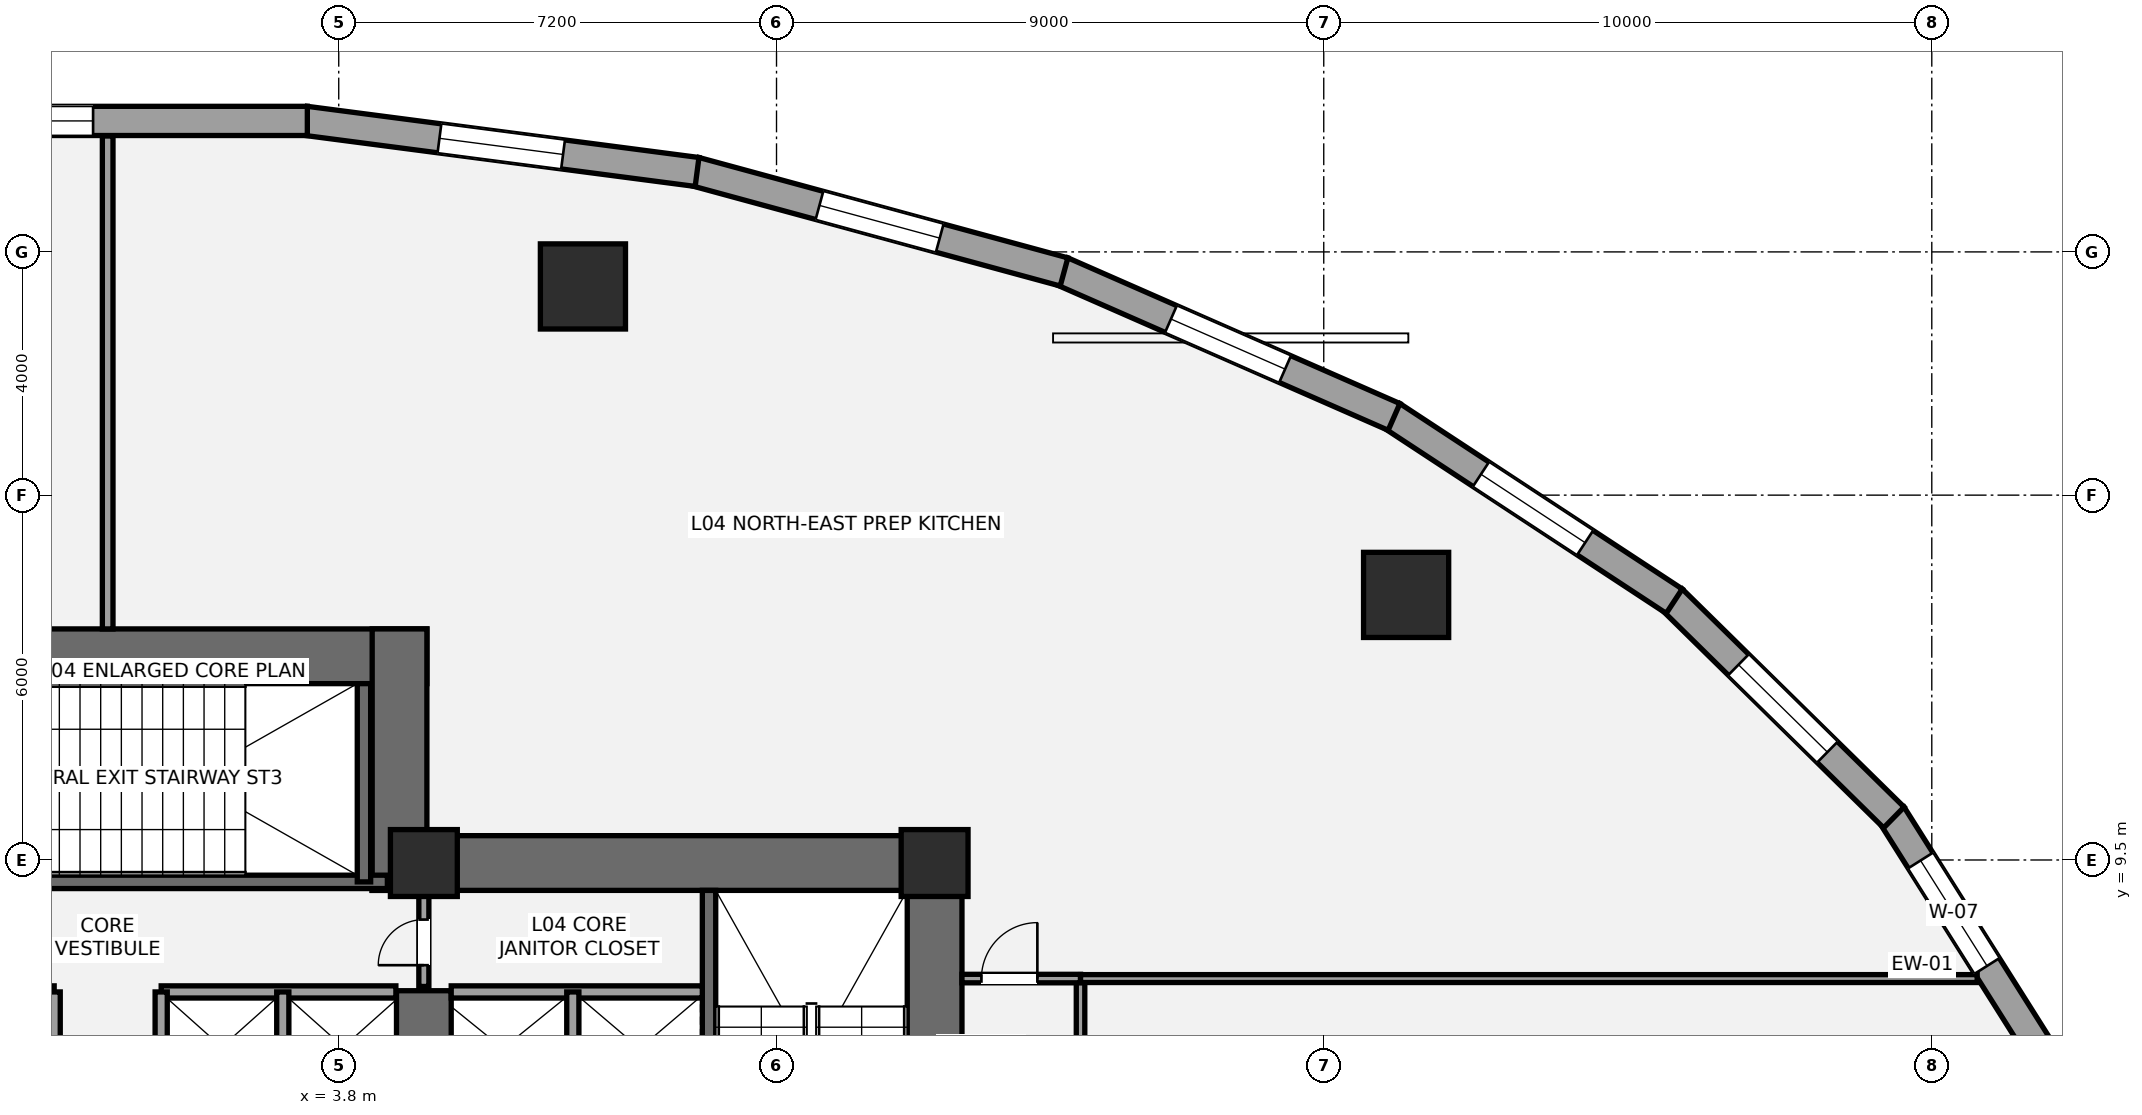
"""IFC4 building model, lengths in metres.
Left out: names, types, materials, properties, quantities, classifications, styles, units other than length and angle.
Written with IfcOpenShell. Run it as: python <this file> out.ifc"""

import sys

from ifc_helpers import new_model, si_unit, direction, frame, frame_2d, origin, origin_2d, place, context, subcontext, project, spatial, rectangle, hollow_circle, extrude, element, fill, save


model = new_model("IFC4")
c1 = context("Model", 3, precision=1e-05, world=origin(), true_north=direction((0.0, 1.0)))
c2 = subcontext(c1, "Body", "Model", "MODEL_VIEW")
j1 = project(units=[si_unit("LENGTHUNIT", "METRE"), si_unit("PLANEANGLEUNIT", "RADIAN")], contexts=[c1])
p1 = place(None, origin())
s1 = spatial("IfcSite", under=j1, at=p1, CompositionType="ELEMENT")
p2 = place(p1, origin())
s2 = spatial("IfcBuilding", under=s1, at=p2, CompositionType="ELEMENT")
p3 = place(p2, frame((0.0, 0.0, 18.6)))
s3 = spatial("IfcBuildingStorey", under=s2, at=p3, CompositionType="ELEMENT", Elevation=18.6)
p4 = place(p3, frame((13.6, 0.95, 0.0), z_axis=(0.0, 0.0, 1.0), x_axis=(0.0, 1.0, 0.0)))
e1 = element("IfcWall", 1, at=p4, inside=s3, PredefinedType="SHEAR", context=c2, shape_type="SweptSolid", body=[
    extrude(rectangle(XDim=8.95, YDim=0.9, at=frame_2d((4.475, 0.0))), origin(), (0.0, 0.0, 1.0), 4.2),
])
p5 = place(p3, frame((4.35, 9.45, 0.0), z_axis=(0.0, 0.0, 1.0), x_axis=(1.0, 0.0, 0.0)))
e2 = element("IfcWall", 2, at=p5, inside=s3, PredefinedType="SHEAR", context=c2, shape_type="SweptSolid", body=[
    extrude(rectangle(XDim=9.7, YDim=0.9, at=frame_2d((4.85, 0.0))), origin(), (0.0, 0.0, 1.0), 4.2),
])
p6 = place(p3, frame((5.2, 5.35, 0.0), z_axis=(0.0, 0.0, 1.0), x_axis=(0.0, 1.0, 0.0)))
e3 = element("IfcWall", 3, at=p6, inside=s3, PredefinedType="SHEAR", context=c2, shape_type="SweptSolid", body=[
    extrude(rectangle(XDim=2.0, YDim=0.9, at=frame_2d((1.0, 0.0))), origin(), (0.0, 0.0, 1.0), 4.2),
])
p7 = place(p3, frame((9.89, 1.85, 0.0), z_axis=(0.0, 0.0, 1.0), x_axis=(0.0, 1.0, 0.0)))
e4 = element("IfcWall", 4, at=p7, inside=s3, PredefinedType="SHEAR", context=c2, shape_type="SweptSolid", body=[
    extrude(rectangle(XDim=7.15, YDim=0.22, at=frame_2d((3.575, 0.0))), origin(), (0.0, 0.0, 1.0), 4.2),
])
p8 = place(p3, frame((-5.25, 12.85, 0.0), z_axis=(0.0, 0.0, 1.0), x_axis=(1.0, 0.0, 0.0)))
e5 = element("IfcWall", 5, at=p8, inside=s3, PredefinedType="SHEAR", context=c2, shape_type="SweptSolid", body=[
    extrude(rectangle(XDim=10.5, YDim=0.9, at=frame_2d((5.25, 0.0))), origin(), (0.0, 0.0, 1.0), 4.2),
])
p9 = place(p3, frame((4.8, 9.0, 0.0), z_axis=(0.0, 0.0, 1.0), x_axis=(0.0, 1.0, 0.0)))
e6 = element("IfcWall", 6, at=p9, inside=s3, PredefinedType="SHEAR", context=c2, shape_type="SweptSolid", body=[
    extrude(rectangle(XDim=4.3, YDim=0.9, at=frame_2d((2.15, 0.0))), origin(), (0.0, 0.0, 1.0), 4.2),
])
p10 = place(p3, frame((-4.7, 9.14, 0.0), z_axis=(0.0, 0.0, 1.0), x_axis=(1.0, 0.0, 0.0)))
e7 = element("IfcWall", 7, at=p10, inside=s3, PredefinedType="SHEAR", context=c2, shape_type="SweptSolid", body=[
    extrude(rectangle(XDim=9.3, YDim=0.22, at=frame_2d((4.65, 0.0))), origin(), (0.0, 0.0, 1.0), 4.2),
])
p11 = place(p10, frame((1.15, 0.0, 0.0)))
e8 = element("IfcOpeningElement", 8, at=p11, cuts=e7, PredefinedType="OPENING", context=c2, shape_type="SweptSolid", body=[
    extrude(rectangle(XDim=1.05, YDim=2.15, at=frame_2d((0.525, 1.075))), frame((0.0, 0.12, 0.0), z_axis=(0.0, -1.0, 0.0), x_axis=(1.0, 0.0, 0.0)), (0.0, 0.0, 1.0), 0.24),
])
p12 = place(p3, frame((4.215, 9.14, 0.0), z_axis=(0.0, 0.0, 1.0), x_axis=(0.0, 1.0, 0.0)))
e9 = element("IfcWall", 9, at=p12, inside=s3, PredefinedType="SHEAR", context=c2, shape_type="SweptSolid", body=[
    extrude(rectangle(XDim=3.26, YDim=0.22, at=frame_2d((1.63, 0.0))), origin(), (0.0, 0.0, 1.0), 4.2),
])
for number, where, z_axis, x_axis in (
    (10, (5.2, 9.45, 0.0), (0.0, 0.0, 1.0), (1.0, 0.0, 0.0)),
    (11, (13.6, 9.45, 0.0), (0.0, 0.0, 1.0), (1.0, 0.0, 0.0)),
):
    element("IfcColumn", number, at=place(p3, frame(where, z_axis=z_axis, x_axis=x_axis)), inside=s3, PredefinedType="COLUMN", context=c2, shape_type="SweptSolid", body=[
        extrude(rectangle(XDim=1.1, YDim=1.1, at=origin_2d()), origin(), (0.0, 0.0, 1.0), 4.2),
    ])
for number, where, z_axis, x_axis in (
    (12, (21.354, 13.859, 0.0), (0.0, 0.0, 1.0), (1.0, 0.0, 0.0)),
    (13, (7.816, 18.932, 0.0), (0.0, 0.0, 1.0), (1.0, 0.0, 0.0)),
):
    element("IfcColumn", number, at=place(p3, frame(where, z_axis=z_axis, x_axis=x_axis)), inside=s3, PredefinedType="USERDEFINED", context=c2, shape_type="SweptSolid", body=[
        extrude(hollow_circle(Radius=0.7, WallThickness=0.05, at=origin_2d()), origin(), (0.0, 0.0, 1.0), 4.2),
    ])
p13 = place(p3, frame((29.341, 10.243, 0.0), z_axis=(0.0, 0.0, 1.0), x_axis=(0.53349762721, -0.845801561693, 0.0)))
e14 = element("IfcWall", 14, at=p13, inside=s3, PredefinedType="STANDARD", context=c2, shape_type="SweptSolid", body=[
    extrude(rectangle(XDim=4.711, YDim=0.48, at=frame_2d((2.355, 0.0))), origin(), (0.0, 0.0, 1.0), 3.109),
])
p14 = place(p13, frame((0.888, 0.0, 0.72)))
e15 = element("IfcOpeningElement", 15, at=p14, cuts=e14, PredefinedType="OPENING", context=c2, shape_type="SweptSolid", body=[
    extrude(rectangle(XDim=2.05, YDim=1.8, at=frame_2d((1.025, 0.9))), frame((0.0, 0.25, 0.0), z_axis=(0.0, -1.0, 0.0), x_axis=(1.0, 0.0, 0.0)), (0.0, 0.0, 1.0), 0.5),
])
p15 = place(p3, frame((25.728, 13.785, 0.0), z_axis=(0.0, 0.0, 1.0), x_axis=(0.713189080178, -0.700971708355, 0.0)))
e16 = element("IfcWall", 16, at=p15, inside=s3, PredefinedType="STANDARD", context=c2, shape_type="SweptSolid", body=[
    extrude(rectangle(XDim=5.116, YDim=0.48, at=frame_2d((2.558, 0.0))), origin(), (0.0, 0.0, 1.0), 3.109),
])
p16 = place(p15, frame((1.533, 0.0, 0.72)))
e17 = element("IfcOpeningElement", 17, at=p16, cuts=e16, PredefinedType="OPENING", context=c2, shape_type="SweptSolid", body=[
    extrude(rectangle(XDim=2.05, YDim=1.8, at=frame_2d((1.025, 0.9))), frame((0.0, 0.25, 0.0), z_axis=(0.0, -1.0, 0.0), x_axis=(1.0, 0.0, 0.0)), (0.0, 0.0, 1.0), 0.5),
])
p17 = place(p3, frame((21.121, 16.806, 0.0), z_axis=(0.0, 0.0, 1.0), x_axis=(0.835863918172, -0.548936708827, 0.0)))
e18 = element("IfcWall", 18, at=p17, inside=s3, PredefinedType="STANDARD", context=c2, shape_type="SweptSolid", body=[
    extrude(rectangle(XDim=5.555, YDim=0.48, at=frame_2d((2.778, 0.0))), origin(), (0.0, 0.0, 1.0), 3.109),
])
p18 = place(p17, frame((1.753, 0.0, 0.72)))
e19 = element("IfcOpeningElement", 19, at=p18, cuts=e18, PredefinedType="OPENING", context=c2, shape_type="SweptSolid", body=[
    extrude(rectangle(XDim=2.05, YDim=1.8, at=frame_2d((1.025, 0.9))), frame((0.0, 0.25, 0.0), z_axis=(0.0, -1.0, 0.0), x_axis=(1.0, 0.0, 0.0)), (0.0, 0.0, 1.0), 0.5),
])
p19 = place(p3, frame((15.695, 19.183, 0.0), z_axis=(0.0, 0.0, 1.0), x_axis=(0.91570760638, -0.401845218484, 0.0)))
e20 = element("IfcWall", 20, at=p19, inside=s3, PredefinedType="STANDARD", context=c2, shape_type="SweptSolid", body=[
    extrude(rectangle(XDim=5.963, YDim=0.48, at=frame_2d((2.981, 0.0))), origin(), (0.0, 0.0, 1.0), 3.109),
])
p20 = place(p19, frame((1.957, 0.0, 0.72)))
e21 = element("IfcOpeningElement", 21, at=p20, cuts=e20, PredefinedType="OPENING", context=c2, shape_type="SweptSolid", body=[
    extrude(rectangle(XDim=2.05, YDim=1.8, at=frame_2d((1.025, 0.9))), frame((0.0, 0.25, 0.0), z_axis=(0.0, -1.0, 0.0), x_axis=(1.0, 0.0, 0.0)), (0.0, 0.0, 1.0), 0.5),
])
p21 = place(p3, frame((9.662, 20.821, 0.0), z_axis=(0.0, 0.0, 1.0), x_axis=(0.964936550718, -0.262483243445, 0.0)))
e22 = element("IfcWall", 22, at=p21, inside=s3, PredefinedType="STANDARD", context=c2, shape_type="SweptSolid", body=[
    extrude(rectangle(XDim=6.288, YDim=0.48, at=frame_2d((3.144, 0.0))), origin(), (0.0, 0.0, 1.0), 3.109),
])
p22 = place(p21, frame((2.119, 0.0, 0.72)))
e23 = element("IfcOpeningElement", 23, at=p22, cuts=e22, PredefinedType="OPENING", context=c2, shape_type="SweptSolid", body=[
    extrude(rectangle(XDim=2.05, YDim=1.8, at=frame_2d((1.025, 0.9))), frame((0.0, 0.25, 0.0), z_axis=(0.0, -1.0, 0.0), x_axis=(1.0, 0.0, 0.0)), (0.0, 0.0, 1.0), 0.5),
])
p23 = place(p3, frame((3.252, 21.656, 0.0), z_axis=(0.0, 0.0, 1.0), x_axis=(0.991576921472, -0.129519144545, 0.0)))
e24 = element("IfcWall", 24, at=p23, inside=s3, PredefinedType="STANDARD", context=c2, shape_type="SweptSolid", body=[
    extrude(rectangle(XDim=6.496, YDim=0.48, at=frame_2d((3.248, 0.0))), origin(), (0.0, 0.0, 1.0), 3.109),
])
p24 = place(p23, frame((2.223, 0.0, 0.72)))
e25 = element("IfcOpeningElement", 25, at=p24, cuts=e24, PredefinedType="OPENING", context=c2, shape_type="SweptSolid", body=[
    extrude(rectangle(XDim=2.05, YDim=1.8, at=frame_2d((1.025, 0.9))), frame((0.0, 0.25, 0.0), z_axis=(0.0, -1.0, 0.0), x_axis=(1.0, 0.0, 0.0)), (0.0, 0.0, 1.0), 0.5),
])
p25 = place(p3, frame((-3.284, 21.654, 0.0), z_axis=(0.0, 0.0, 1.0), x_axis=(1.0, 0.0, 0.0)))
e26 = element("IfcWall", 26, at=p25, inside=s3, PredefinedType="STANDARD", context=c2, shape_type="SweptSolid", body=[
    extrude(rectangle(XDim=6.567, YDim=0.48, at=frame_2d((3.284, 0.0))), origin(), (0.0, 0.0, 1.0), 3.109),
])
p26 = place(p25, frame((0.994, 0.0, 0.72)))
e27 = element("IfcOpeningElement", 27, at=p26, cuts=e26, PredefinedType="OPENING", context=c2, shape_type="SweptSolid", body=[
    extrude(rectangle(XDim=2.05, YDim=1.8, at=frame_2d((1.025, 0.9))), frame((0.0, 0.25, 0.0), z_axis=(0.0, -1.0, 0.0), x_axis=(1.0, 0.0, 0.0)), (0.0, 0.0, 1.0), 0.5),
])
p27 = place(p3, frame((5.65, 7.33, 0.0), z_axis=(0.0, 0.0, 1.0), x_axis=(1.0, 0.0, 0.0)))
e28 = element("IfcWall", 28, at=p27, inside=s3, PredefinedType="SOLIDWALL", context=c2, shape_type="SweptSolid", body=[
    extrude(rectangle(XDim=4.13, YDim=0.2, at=frame_2d((2.065, 0.0))), origin(), (0.0, 0.0, 1.0), 3.98),
])
p28 = place(p3, frame((7.65, 5.47, 0.0), z_axis=(0.0, 0.0, 1.0), x_axis=(0.0, 1.0, 0.0)))
e29 = element("IfcWall", 29, at=p28, inside=s3, PredefinedType="SOLIDWALL", context=c2, shape_type="SweptSolid", body=[
    extrude(rectangle(XDim=1.86, YDim=0.2, at=frame_2d((0.93, 0.0))), origin(), (0.0, 0.0, 1.0), 3.98),
])
for number, where, z_axis, x_axis in (
    (30, (-4.74, 7.33, 0.0), (0.0, 0.0, 1.0), (1.0, 0.0, 0.0)),
    (31, (0.88, 7.33, 0.0), (0.0, 0.0, 1.0), (1.0, 0.0, 0.0)),
):
    element("IfcWall", number, at=place(p3, frame(where, z_axis=z_axis, x_axis=x_axis)), inside=s3, PredefinedType="SOLIDWALL", context=c2, shape_type="SweptSolid", body=[
        extrude(rectangle(XDim=3.86, YDim=0.2, at=frame_2d((1.93, 0.0))), origin(), (0.0, 0.0, 1.0), 3.98),
    ])
for number, where, z_axis, x_axis in (
    (32, (2.88, 5.52, 0.0), (0.0, 0.0, 1.0), (0.0, 1.0, 0.0)),
    (33, (-0.88, 5.52, 0.0), (0.0, 0.0, 1.0), (0.0, 1.0, 0.0)),
    (34, (0.88, 5.52, 0.0), (0.0, 0.0, 1.0), (0.0, 1.0, 0.0)),
):
    element("IfcWall", number, at=place(p3, frame(where, z_axis=z_axis, x_axis=x_axis)), inside=s3, PredefinedType="SOLIDWALL", context=c2, shape_type="SweptSolid", body=[
        extrude(rectangle(XDim=1.81, YDim=0.2, at=frame_2d((0.905, 0.0))), origin(), (0.0, 0.0, 1.0), 3.98),
    ])
p29 = place(p3, frame((5.2, 7.42, 0.0), z_axis=(0.0, 0.0, 1.0), x_axis=(0.0, 1.0, 0.0)))
e35 = element("IfcWall", 35, at=p29, inside=s3, PredefinedType="PARTITIONING", context=c2, shape_type="SweptSolid", body=[
    extrude(rectangle(XDim=1.58, YDim=0.165, at=frame_2d((0.79, 0.0))), origin(), (0.0, 0.0, 1.0), 3.98),
])
p30 = place(p29, frame((0.35, 0.0, 0.0)))
e36 = element("IfcOpeningElement", 36, at=p30, cuts=e35, PredefinedType="OPENING", context=c2, shape_type="SweptSolid", body=[
    extrude(rectangle(XDim=0.75, YDim=2.1, at=frame_2d((0.375, 1.05))), frame((0.0, 0.093, 0.0), z_axis=(0.0, -1.0, 0.0), x_axis=(1.0, 0.0, 0.0)), (0.0, 0.0, 1.0), 0.185),
])
p31 = place(p3, frame((16.0, -18.778, 0.0), z_axis=(0.0, 0.0, 1.0), x_axis=(0.0, 1.0, 0.0)))
e37 = element("IfcWall", 37, at=p31, inside=s3, PredefinedType="PARTITIONING", context=c2, shape_type="SweptSolid", body=[
    extrude(rectangle(XDim=26.328, YDim=0.14, at=frame_2d((13.164, 0.0))), origin(), (0.0, 0.0, 1.0), 3.348),
])
p32 = place(p31, frame((13.628, 0.0, 0.0)))
e38 = element("IfcOpeningElement", 38, at=p32, cuts=e37, PredefinedType="OPENING", context=c2, shape_type="SweptSolid", body=[
    extrude(rectangle(XDim=0.9, YDim=2.1, at=frame_2d((0.45, 1.05))), frame((0.0, 0.08, 0.0), z_axis=(0.0, -1.0, 0.0), x_axis=(1.0, 0.0, 0.0)), (0.0, 0.0, 1.0), 0.16),
])
p33 = place(p31, frame((18.528, 0.0, 0.0)))
e39 = element("IfcOpeningElement", 39, at=p33, cuts=e37, PredefinedType="OPENING", context=c2, shape_type="SweptSolid", body=[
    extrude(rectangle(XDim=0.9, YDim=2.1, at=frame_2d((0.45, 1.05))), frame((0.0, 0.08, 0.0), z_axis=(0.0, -1.0, 0.0), x_axis=(1.0, 0.0, 0.0)), (0.0, 0.0, 1.0), 0.16),
])
p34 = place(p31, frame((23.403, 0.0, 0.0)))
e40 = element("IfcOpeningElement", 40, at=p34, cuts=e37, PredefinedType="OPENING", context=c2, shape_type="SweptSolid", body=[
    extrude(rectangle(XDim=0.9, YDim=2.1, at=frame_2d((0.45, 1.05))), frame((0.0, 0.08, 0.0), z_axis=(0.0, -1.0, 0.0), x_axis=(1.0, 0.0, 0.0)), (0.0, 0.0, 1.0), 0.16),
])
p35 = place(p3, frame((14.05, 7.55, 0.0), z_axis=(0.0, 0.0, 1.0), x_axis=(1.0, 0.0, 0.0)))
e41 = element("IfcWall", 41, at=p35, inside=s3, PredefinedType="PARTITIONING", context=c2, shape_type="SweptSolid", body=[
    extrude(rectangle(XDim=1.95, YDim=0.14, at=frame_2d((0.975, 0.0))), origin(), (0.0, 0.0, 1.0), 3.433),
])
p36 = place(p35, frame((0.32, 0.0, 0.0)))
e42 = element("IfcOpeningElement", 42, at=p36, cuts=e41, PredefinedType="OPENING", context=c2, shape_type="SweptSolid", body=[
    extrude(rectangle(XDim=0.92, YDim=2.15, at=frame_2d((0.46, 1.075))), frame((0.0, 0.08, 0.0), z_axis=(0.0, -1.0, 0.0), x_axis=(1.0, 0.0, 0.0)), (0.0, 0.0, 1.0), 0.16),
])
p37 = place(p3, frame((0.0, 13.3, 0.0), z_axis=(0.0, 0.0, 1.0), x_axis=(0.0, 1.0, 0.0)))
e43 = element("IfcWall", 43, at=p37, inside=s3, PredefinedType="PARTITIONING", context=c2, shape_type="SweptSolid", body=[
    extrude(rectangle(XDim=8.106, YDim=0.175, at=frame_2d((4.053, 0.0))), origin(), (0.0, 0.0, 1.0), 3.98),
])
p38 = place(p3, frame((16.0, 7.55, 0.0), z_axis=(0.0, 0.0, 1.0), x_axis=(1.0, 0.0, 0.0)))
e44 = element("IfcWall", 44, at=p38, inside=s3, PredefinedType="PARTITIONING", context=c2, shape_type="SweptSolid", body=[
    extrude(rectangle(XDim=14.747, YDim=0.13, at=frame_2d((7.373, 0.0))), origin(), (0.0, 0.0, 1.0), 2.958),
])
p39 = place(p14, origin())
e45 = element("IfcWindow", 45, at=p39, inside=s3, PartitioningType="SINGLE_PANEL", PredefinedType="WINDOW", context=c2, shape_type="SweptSolid", body=[
    extrude(rectangle(XDim=2.05, YDim=1.8, at=frame_2d((1.025, 0.9))), frame((0.0, -0.01, 0.0), z_axis=(0.0, -1.0, 0.0), x_axis=(1.0, 0.0, 0.0)), (0.0, 0.0, 1.0), 0.06),
])
fill(e15, e45)
p40 = place(p16, origin())
e46 = element("IfcWindow", 46, at=p40, inside=s3, PartitioningType="SINGLE_PANEL", PredefinedType="WINDOW", context=c2, shape_type="SweptSolid", body=[
    extrude(rectangle(XDim=2.05, YDim=1.8, at=frame_2d((1.025, 0.9))), frame((0.0, -0.01, 0.0), z_axis=(0.0, -1.0, 0.0), x_axis=(1.0, 0.0, 0.0)), (0.0, 0.0, 1.0), 0.06),
])
fill(e17, e46)
p41 = place(p18, origin())
e47 = element("IfcWindow", 47, at=p41, inside=s3, PartitioningType="SINGLE_PANEL", PredefinedType="WINDOW", context=c2, shape_type="SweptSolid", body=[
    extrude(rectangle(XDim=2.05, YDim=1.8, at=frame_2d((1.025, 0.9))), frame((0.0, -0.01, 0.0), z_axis=(0.0, -1.0, 0.0), x_axis=(1.0, 0.0, 0.0)), (0.0, 0.0, 1.0), 0.06),
])
fill(e19, e47)
p42 = place(p20, origin())
e48 = element("IfcWindow", 48, at=p42, inside=s3, PartitioningType="SINGLE_PANEL", PredefinedType="WINDOW", context=c2, shape_type="SweptSolid", body=[
    extrude(rectangle(XDim=2.05, YDim=1.8, at=frame_2d((1.025, 0.9))), frame((0.0, -0.01, 0.0), z_axis=(0.0, -1.0, 0.0), x_axis=(1.0, 0.0, 0.0)), (0.0, 0.0, 1.0), 0.06),
])
fill(e21, e48)
p43 = place(p22, origin())
e49 = element("IfcWindow", 49, at=p43, inside=s3, PartitioningType="SINGLE_PANEL", PredefinedType="WINDOW", context=c2, shape_type="SweptSolid", body=[
    extrude(rectangle(XDim=2.05, YDim=1.8, at=frame_2d((1.025, 0.9))), frame((0.0, -0.01, 0.0), z_axis=(0.0, -1.0, 0.0), x_axis=(1.0, 0.0, 0.0)), (0.0, 0.0, 1.0), 0.06),
])
fill(e23, e49)
p44 = place(p24, origin())
e50 = element("IfcWindow", 50, at=p44, inside=s3, PartitioningType="SINGLE_PANEL", PredefinedType="WINDOW", context=c2, shape_type="SweptSolid", body=[
    extrude(rectangle(XDim=2.05, YDim=1.8, at=frame_2d((1.025, 0.9))), frame((0.0, -0.01, 0.0), z_axis=(0.0, -1.0, 0.0), x_axis=(1.0, 0.0, 0.0)), (0.0, 0.0, 1.0), 0.06),
])
fill(e25, e50)
p45 = place(p26, origin())
e51 = element("IfcWindow", 51, at=p45, inside=s3, PartitioningType="SINGLE_PANEL", PredefinedType="WINDOW", context=c2, shape_type="SweptSolid", body=[
    extrude(rectangle(XDim=2.05, YDim=1.8, at=frame_2d((1.025, 0.9))), frame((0.0, -0.01, 0.0), z_axis=(0.0, -1.0, 0.0), x_axis=(1.0, 0.0, 0.0)), (0.0, 0.0, 1.0), 0.06),
])
fill(e27, e51)
p46 = place(p30, origin())
e52 = element("IfcDoor", 52, at=p46, inside=s3, OperationType="SINGLE_SWING_LEFT", PredefinedType="DOOR", context=c2, shape_type="SweptSolid", body=[
    extrude(rectangle(XDim=0.75, YDim=2.1, at=frame_2d((0.375, 1.05))), frame((0.0, 0.025, 0.0), z_axis=(0.0, -1.0, 0.0), x_axis=(1.0, 0.0, 0.0)), (0.0, 0.0, 1.0), 0.05),
])
fill(e36, e52)
p47 = place(p36, origin())
e53 = element("IfcDoor", 53, at=p47, inside=s3, OperationType="SINGLE_SWING_RIGHT", PredefinedType="DOOR", context=c2, shape_type="SweptSolid", body=[
    extrude(rectangle(XDim=0.92, YDim=2.15, at=frame_2d((0.46, 1.075))), frame((0.0, 0.025, 0.0), z_axis=(0.0, -1.0, 0.0), x_axis=(1.0, 0.0, 0.0)), (0.0, 0.0, 1.0), 0.05),
])
fill(e42, e53)
save(model, sys.argv[1])
